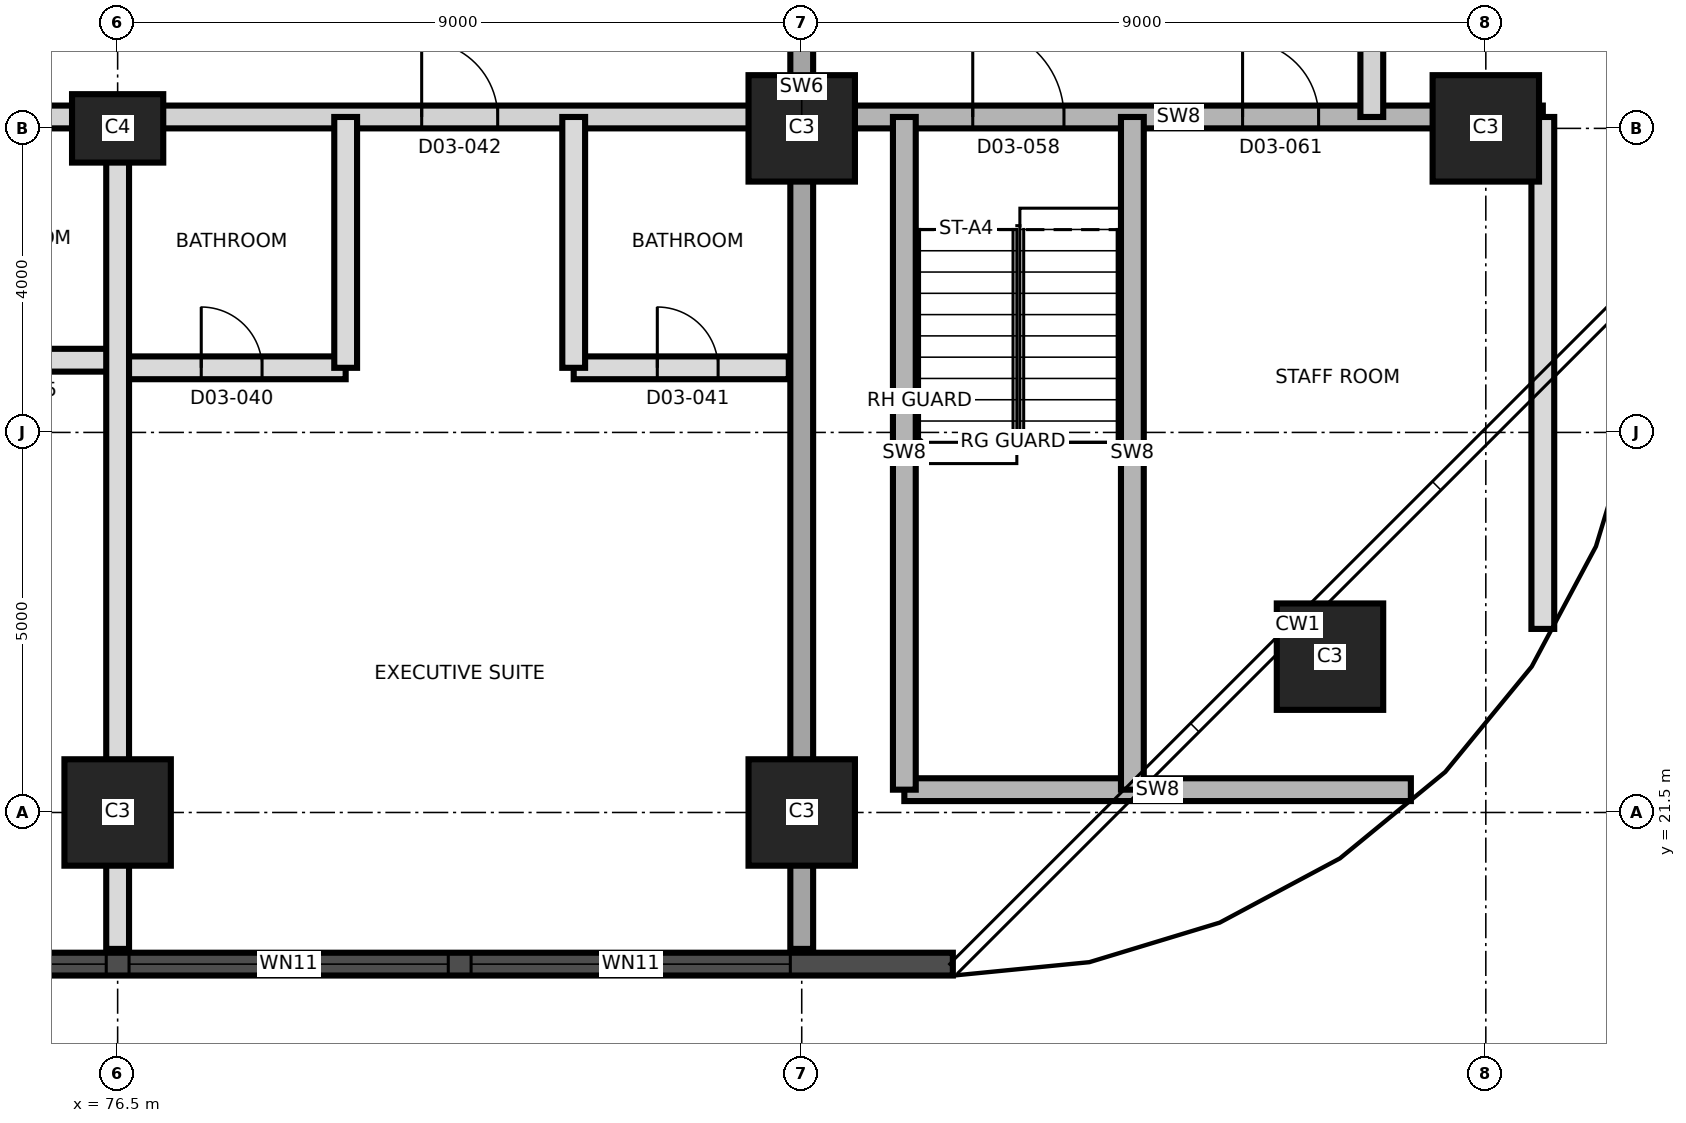
"""IFC4 building model, lengths in metres.
Left out: names, types, materials, properties, quantities, classifications, styles, units other than length and angle.
Written with IfcOpenShell. Run it as: python <this file> out.ifc"""

import sys

from ifc_helpers import new_model, si_unit, direction, frame, frame_2d, origin, origin_2d, place, context, subcontext, project, spatial, rectangle, extrude, element, fill, save


model = new_model("IFC4")
c1 = context("Model", 3, precision=1e-05, world=origin(), true_north=direction((0.0, 1.0)))
c2 = subcontext(c1, "Body", "Model", "MODEL_VIEW")
j1 = project(units=[si_unit("LENGTHUNIT", "METRE"), si_unit("PLANEANGLEUNIT", "RADIAN")], contexts=[c1])
p1 = place(None, origin())
s1 = spatial("IfcSite", under=j1, at=p1, CompositionType="ELEMENT")
p2 = place(p1, origin())
s2 = spatial("IfcBuilding", under=s1, at=p2, CompositionType="ELEMENT")
p3 = place(p2, frame((0.0, 0.0, 52.0)))
s3 = spatial("IfcBuildingStorey", under=s2, at=p3, CompositionType="ELEMENT", Elevation=52.0)
for number, where, z_axis, x_axis in (
    (1, (76.5, 21.5, 0.0), (0.0, 0.0, 1.0), (1.0, 0.0, 0.0)),
    (2, (85.5, 21.5, 0.0), (0.0, 0.0, 1.0), (1.0, 0.0, 0.0)),
    (3, (92.45, 23.55, 0.0), (0.0, 0.0, 1.0), (1.0, 0.0, 0.0)),
):
    element("IfcColumn", number, at=place(p3, frame(where, z_axis=z_axis, x_axis=x_axis)), inside=s3, PredefinedType="COLUMN", context=c2, shape_type="SweptSolid", body=[
        extrude(rectangle(XDim=1.4, YDim=1.4, at=origin_2d()), origin(), (0.0, 0.0, 1.0), 3.7),
    ])
p4 = place(p3, frame((76.5, 30.5, 0.0), z_axis=(0.0, 0.0, 1.0), x_axis=(1.0, 0.0, 0.0)))
e4 = element("IfcColumn", 4, at=p4, inside=s3, PredefinedType="COLUMN", context=c2, shape_type="SweptSolid", body=[
    extrude(rectangle(XDim=1.2, YDim=0.9, at=origin_2d()), origin(), (0.0, 0.0, 1.0), 3.7),
])
for number, where, z_axis, x_axis in (
    (5, (85.5, 30.5, 0.0), (0.0, 0.0, 1.0), (1.0, 0.0, 0.0)),
    (6, (94.5, 30.5, 0.0), (0.0, 0.0, 1.0), (1.0, 0.0, 0.0)),
):
    element("IfcColumn", number, at=place(p3, frame(where, z_axis=z_axis, x_axis=x_axis)), inside=s3, PredefinedType="COLUMN", context=c2, shape_type="SweptSolid", body=[
        extrude(rectangle(XDim=1.4, YDim=1.4, at=origin_2d()), origin(), (0.0, 0.0, 1.0), 3.7),
    ])
p5 = place(p3, frame((85.5, 19.705, 0.0), z_axis=(0.0, 0.0, 1.0), x_axis=(0.0, 1.0, 0.0)))
e7 = element("IfcWall", 7, at=p5, inside=s3, PredefinedType="SHEAR", context=c2, shape_type="SweptSolid", body=[
    extrude(rectangle(XDim=21.59, YDim=0.3, at=frame_2d((10.795, 0.0))), origin(), (0.0, 0.0, 1.0), 3.7),
])
p6 = place(p5, frame((11.995, 0.0, 0.0)))
e8 = element("IfcOpeningElement", 8, at=p6, cuts=e7, PredefinedType="OPENING", context=c2, shape_type="SweptSolid", body=[
    extrude(rectangle(XDim=1.4, YDim=2.1, at=frame_2d((0.7, 1.05))), frame((0.0, 0.16, 0.0), z_axis=(0.0, -1.0, 0.0), x_axis=(1.0, 0.0, 0.0)), (0.0, 0.0, 1.0), 0.32),
])
p7 = place(p3, frame((44.01, 19.505, 0.0), z_axis=(0.0, 0.0, 1.0), x_axis=(1.0, 0.0, 0.0)))
e9 = element("IfcWall", 9, at=p7, inside=s3, PredefinedType="SOLIDWALL", context=c2, shape_type="SweptSolid", body=[
    extrude(rectangle(XDim=43.478, YDim=0.3, at=frame_2d((21.739, 0.0))), origin(), (0.0, 0.0, 1.0), 3.4),
])
p8 = place(p7, frame((1.845, 0.0, 0.3)))
e10 = element("IfcOpeningElement", 10, at=p8, cuts=e9, PredefinedType="OPENING", context=c2, shape_type="SweptSolid", body=[
    extrude(rectangle(XDim=1.8, YDim=2.4, at=frame_2d((0.9, 1.2))), frame((0.0, 0.16, 0.0), z_axis=(0.0, -1.0, 0.0), x_axis=(1.0, 0.0, 0.0)), (0.0, 0.0, 1.0), 0.32),
])
p9 = place(p7, frame((5.64, 0.0, 0.9)))
e11 = element("IfcOpeningElement", 11, at=p9, cuts=e9, PredefinedType="OPENING", context=c2, shape_type="SweptSolid", body=[
    extrude(rectangle(XDim=4.2, YDim=1.5, at=frame_2d((2.1, 0.75))), frame((0.0, 0.16, 0.0), z_axis=(0.0, -1.0, 0.0), x_axis=(1.0, 0.0, 0.0)), (0.0, 0.0, 1.0), 0.32),
])
p10 = place(p7, frame((10.14, 0.0, 0.9)))
e12 = element("IfcOpeningElement", 12, at=p10, cuts=e9, PredefinedType="OPENING", context=c2, shape_type="SweptSolid", body=[
    extrude(rectangle(XDim=4.2, YDim=1.5, at=frame_2d((2.1, 0.75))), frame((0.0, 0.16, 0.0), z_axis=(0.0, -1.0, 0.0), x_axis=(1.0, 0.0, 0.0)), (0.0, 0.0, 1.0), 0.32),
])
p11 = place(p7, frame((14.64, 0.0, 0.9)))
e13 = element("IfcOpeningElement", 13, at=p11, cuts=e9, PredefinedType="OPENING", context=c2, shape_type="SweptSolid", body=[
    extrude(rectangle(XDim=4.2, YDim=1.5, at=frame_2d((2.1, 0.75))), frame((0.0, 0.16, 0.0), z_axis=(0.0, -1.0, 0.0), x_axis=(1.0, 0.0, 0.0)), (0.0, 0.0, 1.0), 0.32),
])
p12 = place(p7, frame((19.14, 0.0, 0.9)))
e14 = element("IfcOpeningElement", 14, at=p12, cuts=e9, PredefinedType="OPENING", context=c2, shape_type="SweptSolid", body=[
    extrude(rectangle(XDim=4.2, YDim=1.5, at=frame_2d((2.1, 0.75))), frame((0.0, 0.16, 0.0), z_axis=(0.0, -1.0, 0.0), x_axis=(1.0, 0.0, 0.0)), (0.0, 0.0, 1.0), 0.32),
])
p13 = place(p7, frame((23.64, 0.0, 0.9)))
e15 = element("IfcOpeningElement", 15, at=p13, cuts=e9, PredefinedType="OPENING", context=c2, shape_type="SweptSolid", body=[
    extrude(rectangle(XDim=4.2, YDim=1.5, at=frame_2d((2.1, 0.75))), frame((0.0, 0.16, 0.0), z_axis=(0.0, -1.0, 0.0), x_axis=(1.0, 0.0, 0.0)), (0.0, 0.0, 1.0), 0.32),
])
p14 = place(p7, frame((28.14, 0.0, 0.9)))
e16 = element("IfcOpeningElement", 16, at=p14, cuts=e9, PredefinedType="OPENING", context=c2, shape_type="SweptSolid", body=[
    extrude(rectangle(XDim=4.2, YDim=1.5, at=frame_2d((2.1, 0.75))), frame((0.0, 0.16, 0.0), z_axis=(0.0, -1.0, 0.0), x_axis=(1.0, 0.0, 0.0)), (0.0, 0.0, 1.0), 0.32),
])
p15 = place(p7, frame((32.64, 0.0, 0.9)))
e17 = element("IfcOpeningElement", 17, at=p15, cuts=e9, PredefinedType="OPENING", context=c2, shape_type="SweptSolid", body=[
    extrude(rectangle(XDim=4.2, YDim=1.5, at=frame_2d((2.1, 0.75))), frame((0.0, 0.16, 0.0), z_axis=(0.0, -1.0, 0.0), x_axis=(1.0, 0.0, 0.0)), (0.0, 0.0, 1.0), 0.32),
])
p16 = place(p7, frame((37.14, 0.0, 0.9)))
e18 = element("IfcOpeningElement", 18, at=p16, cuts=e9, PredefinedType="OPENING", context=c2, shape_type="SweptSolid", body=[
    extrude(rectangle(XDim=4.2, YDim=1.5, at=frame_2d((2.1, 0.75))), frame((0.0, 0.16, 0.0), z_axis=(0.0, -1.0, 0.0), x_axis=(1.0, 0.0, 0.0)), (0.0, 0.0, 1.0), 0.32),
])
p17 = place(p3, frame((86.85, 21.8, 0.0), z_axis=(0.0, 0.0, 1.0), x_axis=(1.0, 0.0, 0.0)))
e19 = element("IfcWall", 19, at=p17, inside=s3, PredefinedType="SHEAR", context=c2, shape_type="SweptSolid", body=[
    extrude(rectangle(XDim=6.664, YDim=0.3, at=frame_2d((3.332, 0.0))), origin(), (0.0, 0.0, 1.0), 3.4),
])
p18 = place(p3, frame((76.5, 27.35, 0.0), z_axis=(0.0, 0.0, 1.0), x_axis=(1.0, 0.0, 0.0)))
e20 = element("IfcWall", 20, at=p18, inside=s3, PredefinedType="PARTITIONING", context=c2, shape_type="SweptSolid", body=[
    extrude(rectangle(XDim=3.0, YDim=0.3, at=frame_2d((1.5, 0.0))), origin(), (0.0, 0.0, 1.0), 3.4),
])
p19 = place(p18, frame((1.1, 0.0, 0.0)))
e21 = element("IfcOpeningElement", 21, at=p19, cuts=e20, PredefinedType="OPENING", context=c2, shape_type="SweptSolid", body=[
    extrude(rectangle(XDim=0.8, YDim=2.1, at=frame_2d((0.4, 1.05))), frame((0.0, 0.16, 0.0), z_axis=(0.0, -1.0, 0.0), x_axis=(1.0, 0.0, 0.0)), (0.0, 0.0, 1.0), 0.32),
])
p20 = place(p3, frame((82.5, 27.35, 0.0), z_axis=(0.0, 0.0, 1.0), x_axis=(1.0, 0.0, 0.0)))
e22 = element("IfcWall", 22, at=p20, inside=s3, PredefinedType="PARTITIONING", context=c2, shape_type="SweptSolid", body=[
    extrude(rectangle(XDim=2.83, YDim=0.3, at=frame_2d((1.415, 0.0))), origin(), (0.0, 0.0, 1.0), 3.4),
])
p21 = place(p20, frame((1.1, 0.0, 0.0)))
e23 = element("IfcOpeningElement", 23, at=p21, cuts=e22, PredefinedType="OPENING", context=c2, shape_type="SweptSolid", body=[
    extrude(rectangle(XDim=0.8, YDim=2.1, at=frame_2d((0.4, 1.05))), frame((0.0, 0.16, 0.0), z_axis=(0.0, -1.0, 0.0), x_axis=(1.0, 0.0, 0.0)), (0.0, 0.0, 1.0), 0.32),
])
p22 = place(p3, frame((73.8, 27.45, 0.0), z_axis=(0.0, 0.0, 1.0), x_axis=(1.0, 0.0, 0.0)))
e24 = element("IfcWall", 24, at=p22, inside=s3, PredefinedType="PARTITIONING", context=c2, shape_type="SweptSolid", body=[
    extrude(rectangle(XDim=2.7, YDim=0.3, at=frame_2d((1.35, 0.0))), origin(), (0.0, 0.0, 1.0), 3.4),
])
p23 = place(p22, frame((0.95, 0.0, 0.0)))
e25 = element("IfcOpeningElement", 25, at=p23, cuts=e24, PredefinedType="OPENING", context=c2, shape_type="SweptSolid", body=[
    extrude(rectangle(XDim=0.8, YDim=2.1, at=frame_2d((0.4, 1.05))), frame((0.0, 0.16, 0.0), z_axis=(0.0, -1.0, 0.0), x_axis=(1.0, 0.0, 0.0)), (0.0, 0.0, 1.0), 0.32),
])
p24 = place(p3, frame((58.95, 30.65, 0.0), z_axis=(0.0, 0.0, 1.0), x_axis=(1.0, 0.0, 0.0)))
e26 = element("IfcWall", 26, at=p24, inside=s3, PredefinedType="PARTITIONING", context=c2, shape_type="SweptSolid", body=[
    extrude(rectangle(XDim=26.38, YDim=0.3, at=frame_2d((13.19, 0.0))), origin(), (0.0, 0.0, 1.0), 3.4),
])
p25 = place(p24, frame((0.685, 0.0, 0.0)))
e27 = element("IfcOpeningElement", 27, at=p25, cuts=e26, PredefinedType="OPENING", context=c2, shape_type="SweptSolid", body=[
    extrude(rectangle(XDim=1.2, YDim=2.1, at=frame_2d((0.6, 1.05))), frame((0.0, 0.16, 0.0), z_axis=(0.0, -1.0, 0.0), x_axis=(1.0, 0.0, 0.0)), (0.0, 0.0, 1.0), 0.32),
])
p26 = place(p24, frame((3.935, 0.0, 0.0)))
e28 = element("IfcOpeningElement", 28, at=p26, cuts=e26, PredefinedType="OPENING", context=c2, shape_type="SweptSolid", body=[
    extrude(rectangle(XDim=1.0, YDim=2.1, at=frame_2d((0.5, 1.05))), frame((0.0, 0.16, 0.0), z_axis=(0.0, -1.0, 0.0), x_axis=(1.0, 0.0, 0.0)), (0.0, 0.0, 1.0), 0.32),
])
p27 = place(p24, frame((9.685, 0.0, 0.0)))
e29 = element("IfcOpeningElement", 29, at=p27, cuts=e26, PredefinedType="OPENING", context=c2, shape_type="SweptSolid", body=[
    extrude(rectangle(XDim=1.2, YDim=2.1, at=frame_2d((0.6, 1.05))), frame((0.0, 0.16, 0.0), z_axis=(0.0, -1.0, 0.0), x_axis=(1.0, 0.0, 0.0)), (0.0, 0.0, 1.0), 0.32),
])
p28 = place(p24, frame((12.935, 0.0, 0.0)))
e30 = element("IfcOpeningElement", 30, at=p28, cuts=e26, PredefinedType="OPENING", context=c2, shape_type="SweptSolid", body=[
    extrude(rectangle(XDim=1.0, YDim=2.1, at=frame_2d((0.5, 1.05))), frame((0.0, 0.16, 0.0), z_axis=(0.0, -1.0, 0.0), x_axis=(1.0, 0.0, 0.0)), (0.0, 0.0, 1.0), 0.32),
])
p29 = place(p24, frame((21.55, 0.0, 0.0)))
e31 = element("IfcOpeningElement", 31, at=p29, cuts=e26, PredefinedType="OPENING", context=c2, shape_type="SweptSolid", body=[
    extrude(rectangle(XDim=1.0, YDim=2.4, at=frame_2d((0.5, 1.2))), frame((0.0, 0.16, 0.0), z_axis=(0.0, -1.0, 0.0), x_axis=(1.0, 0.0, 0.0)), (0.0, 0.0, 1.0), 0.32),
])
p30 = place(p3, frame((85.67, 30.65, 0.0), z_axis=(0.0, 0.0, 1.0), x_axis=(1.0, 0.0, 0.0)))
e32 = element("IfcWall", 32, at=p30, inside=s3, PredefinedType="SHEAR", context=c2, shape_type="SweptSolid", body=[
    extrude(rectangle(XDim=9.58, YDim=0.3, at=frame_2d((4.79, 0.0))), origin(), (0.0, 0.0, 1.0), 3.4),
])
p31 = place(p30, frame((2.08, 0.0, 0.0)))
e33 = element("IfcOpeningElement", 33, at=p31, cuts=e32, PredefinedType="OPENING", context=c2, shape_type="SweptSolid", body=[
    extrude(rectangle(XDim=1.2, YDim=2.1, at=frame_2d((0.6, 1.05))), frame((0.0, 0.16, 0.0), z_axis=(0.0, -1.0, 0.0), x_axis=(1.0, 0.0, 0.0)), (0.0, 0.0, 1.0), 0.32),
])
p32 = place(p30, frame((5.63, 0.0, 0.0)))
e34 = element("IfcOpeningElement", 34, at=p32, cuts=e32, PredefinedType="OPENING", context=c2, shape_type="SweptSolid", body=[
    extrude(rectangle(XDim=1.0, YDim=2.1, at=frame_2d((0.5, 1.05))), frame((0.0, 0.16, 0.0), z_axis=(0.0, -1.0, 0.0), x_axis=(1.0, 0.0, 0.0)), (0.0, 0.0, 1.0), 0.32),
])
p33 = place(p3, frame((76.5, 19.705, 0.0), z_axis=(0.0, 0.0, 1.0), x_axis=(0.0, 1.0, 0.0)))
e35 = element("IfcWall", 35, at=p33, inside=s3, PredefinedType="PARTITIONING", context=c2, shape_type="SweptSolid", body=[
    extrude(rectangle(XDim=10.945, YDim=0.3, at=frame_2d((5.472, 0.0))), origin(), (0.0, 0.0, 1.0), 3.4),
])
for number, where, z_axis, x_axis in (
    (36, (79.5, 27.35, 0.0), (0.0, 0.0, 1.0), (0.0, 1.0, 0.0)),
    (37, (82.5, 27.35, 0.0), (0.0, 0.0, 1.0), (0.0, 1.0, 0.0)),
):
    element("IfcWall", number, at=place(p3, frame(where, z_axis=z_axis, x_axis=x_axis)), inside=s3, PredefinedType="PARTITIONING", context=c2, shape_type="SweptSolid", body=[
        extrude(rectangle(XDim=3.3, YDim=0.3, at=frame_2d((1.65, 0.0))), origin(), (0.0, 0.0, 1.0), 3.4),
    ])
for number, where, z_axis, x_axis in (
    (38, (86.85, 21.8, 0.0), (0.0, 0.0, 1.0), (0.0, 1.0, 0.0)),
    (39, (89.85, 21.8, 0.0), (0.0, 0.0, 1.0), (0.0, 1.0, 0.0)),
):
    element("IfcWall", number, at=place(p3, frame(where, z_axis=z_axis, x_axis=x_axis)), inside=s3, PredefinedType="SHEAR", context=c2, shape_type="SweptSolid", body=[
        extrude(rectangle(XDim=8.85, YDim=0.3, at=frame_2d((4.425, 0.0))), origin(), (0.0, 0.0, 1.0), 3.4),
    ])
p34 = place(p3, frame((93.0, 30.65, 0.0), z_axis=(0.0, 0.0, 1.0), x_axis=(0.0, 1.0, 0.0)))
e40 = element("IfcWall", 40, at=p34, inside=s3, PredefinedType="PARTITIONING", context=c2, shape_type="SweptSolid", body=[
    extrude(rectangle(XDim=2.7, YDim=0.3, at=frame_2d((1.35, 0.0))), origin(), (0.0, 0.0, 1.0), 3.4),
])
p35 = place(p3, frame((95.25, 23.915, 0.0), z_axis=(0.0, 0.0, 1.0), x_axis=(0.0, 1.0, 0.0)))
e41 = element("IfcWall", 41, at=p35, inside=s3, PredefinedType="PARTITIONING", context=c2, shape_type="SweptSolid", body=[
    extrude(rectangle(XDim=6.735, YDim=0.3, at=frame_2d((3.367, 0.0))), origin(), (0.0, 0.0, 1.0), 3.4),
])
p36 = place(p14, origin())
e42 = element("IfcWindow", 42, at=p36, inside=s3, PartitioningType="SINGLE_PANEL", PredefinedType="WINDOW", context=c2, shape_type="SweptSolid", body=[
    extrude(rectangle(XDim=4.2, YDim=1.5, at=frame_2d((2.1, 0.75))), frame((0.0, 0.03, 0.0), z_axis=(0.0, -1.0, 0.0), x_axis=(1.0, 0.0, 0.0)), (0.0, 0.0, 1.0), 0.06),
])
fill(e16, e42)
p37 = place(p15, origin())
e43 = element("IfcWindow", 43, at=p37, inside=s3, PartitioningType="SINGLE_PANEL", PredefinedType="WINDOW", context=c2, shape_type="SweptSolid", body=[
    extrude(rectangle(XDim=4.2, YDim=1.5, at=frame_2d((2.1, 0.75))), frame((0.0, 0.03, 0.0), z_axis=(0.0, -1.0, 0.0), x_axis=(1.0, 0.0, 0.0)), (0.0, 0.0, 1.0), 0.06),
])
fill(e17, e43)
p38 = place(p16, origin())
e44 = element("IfcWindow", 44, at=p38, inside=s3, PartitioningType="SINGLE_PANEL", PredefinedType="WINDOW", context=c2, shape_type="SweptSolid", body=[
    extrude(rectangle(XDim=4.2, YDim=1.5, at=frame_2d((2.1, 0.75))), frame((0.0, 0.03, 0.0), z_axis=(0.0, -1.0, 0.0), x_axis=(1.0, 0.0, 0.0)), (0.0, 0.0, 1.0), 0.06),
])
fill(e18, e44)
p39 = place(p19, origin())
e45 = element("IfcDoor", 45, at=p39, inside=s3, OperationType="SINGLE_SWING_LEFT", PredefinedType="DOOR", context=c2, shape_type="SweptSolid", body=[
    extrude(rectangle(XDim=0.8, YDim=2.1, at=frame_2d((0.4, 1.05))), frame((0.0, 0.025, 0.0), z_axis=(0.0, -1.0, 0.0), x_axis=(1.0, 0.0, 0.0)), (0.0, 0.0, 1.0), 0.05),
])
fill(e21, e45)
p40 = place(p21, origin())
e46 = element("IfcDoor", 46, at=p40, inside=s3, OperationType="SINGLE_SWING_LEFT", PredefinedType="DOOR", context=c2, shape_type="SweptSolid", body=[
    extrude(rectangle(XDim=0.8, YDim=2.1, at=frame_2d((0.4, 1.05))), frame((0.0, 0.025, 0.0), z_axis=(0.0, -1.0, 0.0), x_axis=(1.0, 0.0, 0.0)), (0.0, 0.0, 1.0), 0.05),
])
fill(e23, e46)
p41 = place(p29, origin())
e47 = element("IfcDoor", 47, at=p41, inside=s3, OperationType="SINGLE_SWING_RIGHT", PredefinedType="DOOR", context=c2, shape_type="SweptSolid", body=[
    extrude(rectangle(XDim=1.0, YDim=2.4, at=frame_2d((0.5, 1.2))), frame((0.0, 0.025, 0.0), z_axis=(0.0, -1.0, 0.0), x_axis=(1.0, 0.0, 0.0)), (0.0, 0.0, 1.0), 0.05),
])
fill(e31, e47)
p42 = place(p31, origin())
e48 = element("IfcDoor", 48, at=p42, inside=s3, OperationType="SINGLE_SWING_LEFT", PredefinedType="DOOR", context=c2, shape_type="SweptSolid", body=[
    extrude(rectangle(XDim=1.2, YDim=2.1, at=frame_2d((0.6, 1.05))), frame((0.0, 0.025, 0.0), z_axis=(0.0, -1.0, 0.0), x_axis=(1.0, 0.0, 0.0)), (0.0, 0.0, 1.0), 0.05),
])
fill(e33, e48)
p43 = place(p32, origin())
e49 = element("IfcDoor", 49, at=p43, inside=s3, OperationType="SINGLE_SWING_LEFT", PredefinedType="DOOR", context=c2, shape_type="SweptSolid", body=[
    extrude(rectangle(XDim=1.0, YDim=2.1, at=frame_2d((0.5, 1.05))), frame((0.0, 0.025, 0.0), z_axis=(0.0, -1.0, 0.0), x_axis=(1.0, 0.0, 0.0)), (0.0, 0.0, 1.0), 0.05),
])
fill(e34, e49)
save(model, sys.argv[1])
